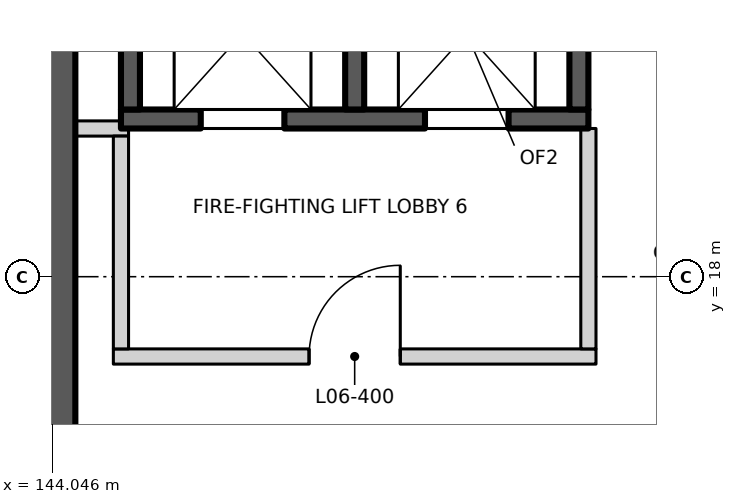
"""IFC4 building model, lengths in metres.
Left out: names, types, materials, properties, quantities, classifications, styles, units other than length and angle.
Written with IfcOpenShell. Run it as: python <this file> out.ifc"""

import sys

from ifc_helpers import new_model, si_unit, direction, frame, frame_2d, origin, place, context, subcontext, project, spatial, rectangle, extrude, element, fill, save


model = new_model("IFC4")
c1 = context("Model", 3, precision=1e-05, world=origin(), true_north=direction((0.0, 1.0)))
c2 = subcontext(c1, "Body", "Model", "MODEL_VIEW")
j1 = project(units=[si_unit("LENGTHUNIT", "METRE"), si_unit("PLANEANGLEUNIT", "RADIAN")], contexts=[c1])
p1 = place(None, origin())
s1 = spatial("IfcSite", under=j1, at=p1, CompositionType="ELEMENT")
p2 = place(p1, origin())
s2 = spatial("IfcBuilding", under=s1, at=p2, CompositionType="ELEMENT")
p3 = place(p2, frame((0.0, 0.0, 28.5)))
s3 = spatial("IfcBuildingStorey", under=s2, at=p3, CompositionType="ELEMENT", Elevation=28.5)
p4 = place(p3, frame((144.95, 20.075, 0.0), z_axis=(0.0, 0.0, 1.0), x_axis=(1.0, 0.0, 0.0)))
e1 = element("IfcWall", 1, at=p4, inside=s3, PredefinedType="SHEAR", context=c2, shape_type="SweptSolid", body=[
    extrude(rectangle(XDim=6.15, YDim=0.25, at=frame_2d((3.075, 0.0))), origin(), (0.0, 0.0, 1.0), 4.5),
])
p5 = place(p4, frame((1.05, 0.0, 0.0)))
e2 = element("IfcOpeningElement", 2, at=p5, cuts=e1, PredefinedType="OPENING", context=c2, shape_type="SweptSolid", body=[
    extrude(rectangle(XDim=1.1, YDim=2.1, at=frame_2d((0.55, 1.05))), frame((0.0, 0.135, 0.0), z_axis=(0.0, -1.0, 0.0), x_axis=(1.0, 0.0, 0.0)), (0.0, 0.0, 1.0), 0.27),
])
p6 = place(p4, frame((4.0, 0.0, 0.0)))
e3 = element("IfcOpeningElement", 3, at=p6, cuts=e1, PredefinedType="OPENING", context=c2, shape_type="SweptSolid", body=[
    extrude(rectangle(XDim=1.1, YDim=2.1, at=frame_2d((0.55, 1.05))), frame((0.0, 0.135, 0.0), z_axis=(0.0, -1.0, 0.0), x_axis=(1.0, 0.0, 0.0)), (0.0, 0.0, 1.0), 0.27),
])
for number, where, z_axis, x_axis in (
    (4, (145.075, 20.2, 0.0), (0.0, 0.0, 1.0), (0.0, 1.0, 0.0)),
    (5, (148.025, 20.2, 0.0), (0.0, 0.0, 1.0), (0.0, 1.0, 0.0)),
    (6, (150.975, 20.2, 0.0), (0.0, 0.0, 1.0), (0.0, 1.0, 0.0)),
):
    element("IfcWall", number, at=place(p3, frame(where, z_axis=z_axis, x_axis=x_axis)), inside=s3, PredefinedType="SHEAR", context=c2, shape_type="SweptSolid", body=[
        extrude(rectangle(XDim=2.7, YDim=0.25, at=frame_2d((1.35, 0.0))), origin(), (0.0, 0.0, 1.0), 4.5),
    ])
p7 = place(p3, frame((144.85, 16.95, 0.0), z_axis=(0.0, 0.0, 1.0), x_axis=(1.0, 0.0, 0.0)))
e7 = element("IfcWall", 7, at=p7, inside=s3, PredefinedType="PARTITIONING", context=c2, shape_type="SweptSolid", body=[
    extrude(rectangle(XDim=6.35, YDim=0.2, at=frame_2d((3.175, 0.0))), origin(), (0.0, 0.0, 1.0), 4.2),
])
p8 = place(p7, frame((2.575, 0.0, 0.0)))
e8 = element("IfcOpeningElement", 8, at=p8, cuts=e7, PredefinedType="OPENING", context=c2, shape_type="SweptSolid", body=[
    extrude(rectangle(XDim=1.2, YDim=2.1, at=frame_2d((0.6, 1.05))), frame((0.0, 0.11, 0.0), z_axis=(0.0, -1.0, 0.0), x_axis=(1.0, 0.0, 0.0)), (0.0, 0.0, 1.0), 0.22),
])
p9 = place(p3, frame((144.35, 19.95, 0.0), z_axis=(0.0, 0.0, 1.0), x_axis=(1.0, 0.0, 0.0)))
e9 = element("IfcWall", 9, at=p9, inside=s3, PredefinedType="PARTITIONING", context=c2, shape_type="SweptSolid", body=[
    extrude(rectangle(XDim=0.7, YDim=0.2, at=frame_2d((0.35, 0.0))), origin(), (0.0, 0.0, 1.0), 4.2),
])
p10 = place(p3, frame((144.175, 9.35, 0.0), z_axis=(0.0, 0.0, 1.0), x_axis=(0.0, 1.0, 0.0)))
e10 = element("IfcWall", 10, at=p10, inside=s3, PredefinedType="SHEAR", context=c2, shape_type="SweptSolid", body=[
    extrude(rectangle(XDim=17.4, YDim=0.35, at=frame_2d((8.7, 0.0))), origin(), (0.0, 0.0, 1.0), 4.2),
])
p11 = place(p10, frame((3.75, 0.0, 0.0)))
e11 = element("IfcOpeningElement", 11, at=p11, cuts=e10, PredefinedType="OPENING", context=c2, shape_type="SweptSolid", body=[
    extrude(rectangle(XDim=1.6, YDim=2.4, at=frame_2d((0.8, 1.2))), frame((0.0, 0.185, 0.0), z_axis=(0.0, -1.0, 0.0), x_axis=(1.0, 0.0, 0.0)), (0.0, 0.0, 1.0), 0.37),
])
p12 = place(p3, frame((144.95, 17.05, 0.0), z_axis=(0.0, 0.0, 1.0), x_axis=(0.0, 1.0, 0.0)))
e12 = element("IfcWall", 12, at=p12, inside=s3, PredefinedType="PARTITIONING", context=c2, shape_type="SweptSolid", body=[
    extrude(rectangle(XDim=2.8, YDim=0.2, at=frame_2d((1.4, 0.0))), origin(), (0.0, 0.0, 1.0), 4.2),
])
p13 = place(p3, frame((151.1, 17.05, 0.0), z_axis=(0.0, 0.0, 1.0), x_axis=(0.0, 1.0, 0.0)))
e13 = element("IfcWall", 13, at=p13, inside=s3, PredefinedType="PARTITIONING", context=c2, shape_type="SweptSolid", body=[
    extrude(rectangle(XDim=2.9, YDim=0.2, at=frame_2d((1.45, 0.0))), origin(), (0.0, 0.0, 1.0), 4.2),
])
p14 = place(p5, origin())
e14 = element("IfcDoor", 14, at=p14, inside=s3, OperationType="DOUBLE_DOOR_SLIDING", PredefinedType="DOOR", context=c2, shape_type="SweptSolid", body=[
    extrude(rectangle(XDim=1.1, YDim=2.1, at=frame_2d((0.55, 1.05))), frame((0.0, 0.025, 0.0), z_axis=(0.0, -1.0, 0.0), x_axis=(1.0, 0.0, 0.0)), (0.0, 0.0, 1.0), 0.05),
])
fill(e2, e14)
p15 = place(p6, origin())
e15 = element("IfcDoor", 15, at=p15, inside=s3, OperationType="DOUBLE_DOOR_SLIDING", PredefinedType="DOOR", context=c2, shape_type="SweptSolid", body=[
    extrude(rectangle(XDim=1.1, YDim=2.1, at=frame_2d((0.55, 1.05))), frame((0.0, 0.025, 0.0), z_axis=(0.0, -1.0, 0.0), x_axis=(1.0, 0.0, 0.0)), (0.0, 0.0, 1.0), 0.05),
])
fill(e3, e15)
p16 = place(p8, origin())
e16 = element("IfcDoor", 16, at=p16, inside=s3, OperationType="SINGLE_SWING_RIGHT", PredefinedType="DOOR", context=c2, shape_type="SweptSolid", body=[
    extrude(rectangle(XDim=1.2, YDim=2.1, at=frame_2d((0.6, 1.05))), frame((0.0, 0.025, 0.0), z_axis=(0.0, -1.0, 0.0), x_axis=(1.0, 0.0, 0.0)), (0.0, 0.0, 1.0), 0.05),
])
fill(e8, e16)
save(model, sys.argv[1])
